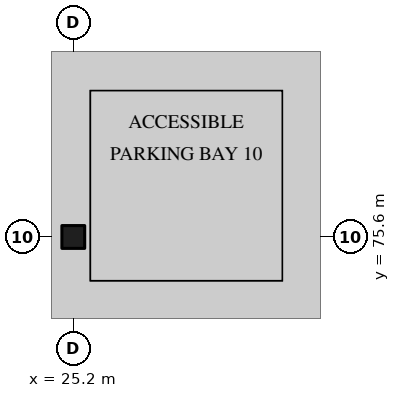
"""IFC4 building model, lengths in metres.
Left out: names, types, materials, properties, quantities, classifications, styles, units other than length and angle.
Written with IfcOpenShell. Run it as: python <this file> out.ifc"""

import sys

from ifc_helpers import new_model, si_unit, direction, frame, origin, origin_2d, place, context, subcontext, project, spatial, rectangle, extrude, element, save


model = new_model("IFC4")
c1 = context("Model", 3, precision=1e-05, world=origin(), true_north=direction((0.0, 1.0)))
c2 = subcontext(c1, "Body", "Model", "MODEL_VIEW")
j1 = project(units=[si_unit("LENGTHUNIT", "METRE"), si_unit("PLANEANGLEUNIT", "RADIAN")], contexts=[c1])
p1 = place(None, origin())
s1 = spatial("IfcSite", under=j1, at=p1, CompositionType="ELEMENT")
p2 = place(p1, origin())
s2 = spatial("IfcBuilding", under=s1, at=p2, CompositionType="ELEMENT")
p3 = place(p2, frame((0.0, 0.0, -4.5)))
s3 = spatial("IfcBuildingStorey", under=s2, at=p3, CompositionType="ELEMENT", Elevation=-4.5)
p4 = place(p3, frame((25.2, 75.6, 0.0), z_axis=(0.0, 0.0, 1.0), x_axis=(1.0, 0.0, 0.0)))
e1 = element("IfcColumn", 1, at=p4, inside=s3, PredefinedType="COLUMN", context=c2, shape_type="SweptSolid", body=[
    extrude(rectangle(XDim=0.6, YDim=0.6, at=origin_2d()), origin(), (0.0, 0.0, 1.0), 4.05),
])
save(model, sys.argv[1])
